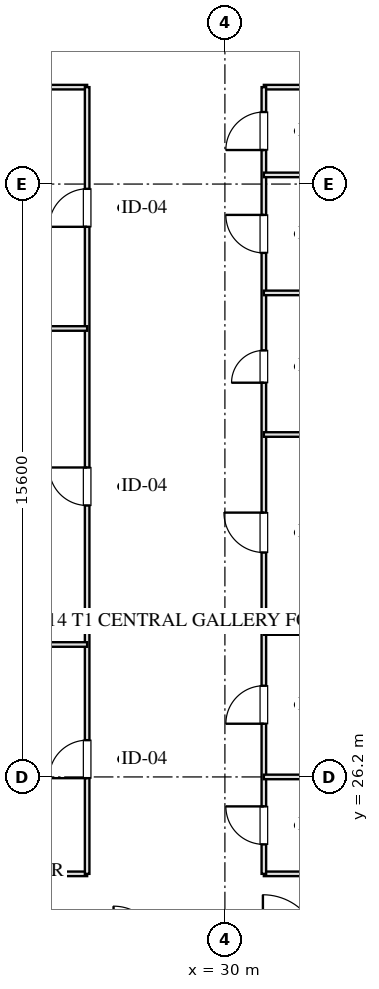
"""IFC4 building model, lengths in metres.
Left out: names, types, materials, properties, quantities, classifications, styles, units other than length and angle.
Written with IfcOpenShell. Run it as: python <this file> out.ifc"""

import sys

from ifc_helpers import new_model, si_unit, direction, frame, frame_2d, origin, place, context, subcontext, project, spatial, rectangle, extrude, element, fill, save


model = new_model("IFC4")
c1 = context("Model", 3, precision=1e-05, world=origin(), true_north=direction((0.0, 1.0)))
c2 = subcontext(c1, "Body", "Model", "MODEL_VIEW")
j1 = project(units=[si_unit("LENGTHUNIT", "METRE"), si_unit("PLANEANGLEUNIT", "RADIAN")], contexts=[c1])
p1 = place(None, origin())
s1 = spatial("IfcSite", under=j1, at=p1, CompositionType="ELEMENT")
p2 = place(p1, origin())
s2 = spatial("IfcBuilding", under=s1, at=p2, CompositionType="ELEMENT")
p3 = place(p2, frame((0.0, 0.0, 60.95)))
s3 = spatial("IfcBuildingStorey", under=s2, at=p3, CompositionType="ELEMENT", Elevation=60.95)
p4 = place(p3, frame((10.6, 23.65, 0.0), z_axis=(0.0, 0.0, 1.0), x_axis=(1.0, 0.0, 0.0)))
e1 = element("IfcWall", 1, at=p4, inside=s3, PredefinedType="PARTITIONING", context=c2, shape_type="SweptSolid", body=[
    extrude(rectangle(XDim=15.775, YDim=0.12, at=frame_2d((7.887, 0.0))), origin(), (0.0, 0.0, 1.0), 3.175),
])
p5 = place(p3, frame((31.025, 23.65, 0.0), z_axis=(0.0, 0.0, 1.0), x_axis=(1.0, 0.0, 0.0)))
e2 = element("IfcWall", 2, at=p5, inside=s3, PredefinedType="PARTITIONING", context=c2, shape_type="SweptSolid", body=[
    extrude(rectangle(XDim=18.375, YDim=0.12, at=frame_2d((9.188, 0.0))), origin(), (0.0, 0.0, 1.0), 3.175),
])
p6 = place(p3, frame((10.6, 44.35, 0.0), z_axis=(0.0, 0.0, 1.0), x_axis=(1.0, 0.0, 0.0)))
e3 = element("IfcWall", 3, at=p6, inside=s3, PredefinedType="PARTITIONING", context=c2, shape_type="SweptSolid", body=[
    extrude(rectangle(XDim=15.775, YDim=0.12, at=frame_2d((7.887, 0.0))), origin(), (0.0, 0.0, 1.0), 3.175),
])
p7 = place(p3, frame((31.025, 44.35, 0.0), z_axis=(0.0, 0.0, 1.0), x_axis=(1.0, 0.0, 0.0)))
e4 = element("IfcWall", 4, at=p7, inside=s3, PredefinedType="PARTITIONING", context=c2, shape_type="SweptSolid", body=[
    extrude(rectangle(XDim=18.375, YDim=0.12, at=frame_2d((9.188, 0.0))), origin(), (0.0, 0.0, 1.0), 3.175),
])
p8 = place(p3, frame((26.375, 23.65, 0.0), z_axis=(0.0, 0.0, 1.0), x_axis=(0.0, 1.0, 0.0)))
e5 = element("IfcWall", 5, at=p8, inside=s3, PredefinedType="PARTITIONING", context=c2, shape_type="SweptSolid", body=[
    extrude(rectangle(XDim=20.7, YDim=0.12, at=frame_2d((10.35, 0.0))), origin(), (0.0, 0.0, 1.0), 3.175),
])
p9 = place(p8, frame((2.518, 0.0, 0.0)))
e6 = element("IfcOpeningElement", 6, at=p9, cuts=e5, PredefinedType="OPENING", context=c2, shape_type="SweptSolid", body=[
    extrude(rectangle(XDim=1.0, YDim=2.05, at=frame_2d((0.5, 1.025))), frame((0.0, 0.07, 0.0), z_axis=(0.0, -1.0, 0.0), x_axis=(1.0, 0.0, 0.0)), (0.0, 0.0, 1.0), 0.14),
])
p10 = place(p8, frame((9.692, 0.0, 0.0)))
e7 = element("IfcOpeningElement", 7, at=p10, cuts=e5, PredefinedType="OPENING", context=c2, shape_type="SweptSolid", body=[
    extrude(rectangle(XDim=1.0, YDim=2.05, at=frame_2d((0.5, 1.025))), frame((0.0, 0.07, 0.0), z_axis=(0.0, -1.0, 0.0), x_axis=(1.0, 0.0, 0.0)), (0.0, 0.0, 1.0), 0.14),
])
p11 = place(p8, frame((17.025, 0.0, 0.0)))
e8 = element("IfcOpeningElement", 8, at=p11, cuts=e5, PredefinedType="OPENING", context=c2, shape_type="SweptSolid", body=[
    extrude(rectangle(XDim=1.0, YDim=2.05, at=frame_2d((0.5, 1.025))), frame((0.0, 0.07, 0.0), z_axis=(0.0, -1.0, 0.0), x_axis=(1.0, 0.0, 0.0)), (0.0, 0.0, 1.0), 0.14),
])
p12 = place(p3, frame((31.025, 23.65, 0.0), z_axis=(0.0, 0.0, 1.0), x_axis=(0.0, 1.0, 0.0)))
e9 = element("IfcWall", 9, at=p12, inside=s3, PredefinedType="PARTITIONING", context=c2, shape_type="SweptSolid", body=[
    extrude(rectangle(XDim=20.7, YDim=0.12, at=frame_2d((10.35, 0.0))), origin(), (0.0, 0.0, 1.0), 3.175),
])
p13 = place(p12, frame((0.775, 0.0, 0.0)))
e10 = element("IfcOpeningElement", 10, at=p13, cuts=e9, PredefinedType="OPENING", context=c2, shape_type="SweptSolid", body=[
    extrude(rectangle(XDim=1.0, YDim=2.05, at=frame_2d((0.5, 1.025))), frame((0.0, 0.07, 0.0), z_axis=(0.0, -1.0, 0.0), x_axis=(1.0, 0.0, 0.0)), (0.0, 0.0, 1.0), 0.14),
])
p14 = place(p12, frame((3.95, 0.0, 0.0)))
e11 = element("IfcOpeningElement", 11, at=p14, cuts=e9, PredefinedType="OPENING", context=c2, shape_type="SweptSolid", body=[
    extrude(rectangle(XDim=1.0, YDim=2.05, at=frame_2d((0.5, 1.025))), frame((0.0, 0.07, 0.0), z_axis=(0.0, -1.0, 0.0), x_axis=(1.0, 0.0, 0.0)), (0.0, 0.0, 1.0), 0.14),
])
p15 = place(p12, frame((8.455, 0.0, 0.0)))
e12 = element("IfcOpeningElement", 12, at=p15, cuts=e9, PredefinedType="OPENING", context=c2, shape_type="SweptSolid", body=[
    extrude(rectangle(XDim=1.05, YDim=2.05, at=frame_2d((0.525, 1.025))), frame((0.0, 0.07, 0.0), z_axis=(0.0, -1.0, 0.0), x_axis=(1.0, 0.0, 0.0)), (0.0, 0.0, 1.0), 0.14),
])
p16 = place(p12, frame((12.923, 0.0, 0.0)))
e13 = element("IfcOpeningElement", 13, at=p16, cuts=e9, PredefinedType="OPENING", context=c2, shape_type="SweptSolid", body=[
    extrude(rectangle(XDim=0.85, YDim=2.05, at=frame_2d((0.425, 1.025))), frame((0.0, 0.07, 0.0), z_axis=(0.0, -1.0, 0.0), x_axis=(1.0, 0.0, 0.0)), (0.0, 0.0, 1.0), 0.14),
])
p17 = place(p12, frame((16.338, 0.0, 0.0)))
e14 = element("IfcOpeningElement", 14, at=p17, cuts=e9, PredefinedType="OPENING", context=c2, shape_type="SweptSolid", body=[
    extrude(rectangle(XDim=1.0, YDim=2.05, at=frame_2d((0.5, 1.025))), frame((0.0, 0.07, 0.0), z_axis=(0.0, -1.0, 0.0), x_axis=(1.0, 0.0, 0.0)), (0.0, 0.0, 1.0), 0.14),
])
p18 = place(p12, frame((19.045, 0.0, 0.0)))
e15 = element("IfcOpeningElement", 15, at=p18, cuts=e9, PredefinedType="OPENING", context=c2, shape_type="SweptSolid", body=[
    extrude(rectangle(XDim=1.0, YDim=2.05, at=frame_2d((0.5, 1.025))), frame((0.0, 0.07, 0.0), z_axis=(0.0, -1.0, 0.0), x_axis=(1.0, 0.0, 0.0)), (0.0, 0.0, 1.0), 0.14),
])
for number, where, z_axis, x_axis in (
    (16, (10.6, 29.685, 0.0), (0.0, 0.0, 1.0), (1.0, 0.0, 0.0)),
    (17, (10.6, 38.0, 0.0), (0.0, 0.0, 1.0), (1.0, 0.0, 0.0)),
):
    element("IfcWall", number, at=place(p3, frame(where, z_axis=z_axis, x_axis=x_axis)), inside=s3, PredefinedType="PARTITIONING", context=c2, shape_type="SweptSolid", body=[
        extrude(rectangle(XDim=15.775, YDim=0.12, at=frame_2d((7.887, 0.0))), origin(), (0.0, 0.0, 1.0), 3.175),
    ])
for number, where, z_axis, x_axis in (
    (18, (31.025, 26.2, 0.0), (0.0, 0.0, 1.0), (1.0, 0.0, 0.0)),
    (19, (31.025, 30.0, 0.0), (0.0, 0.0, 1.0), (1.0, 0.0, 0.0)),
    (20, (31.025, 35.21, 0.0), (0.0, 0.0, 1.0), (1.0, 0.0, 0.0)),
    (21, (31.025, 38.936, 0.0), (0.0, 0.0, 1.0), (1.0, 0.0, 0.0)),
    (22, (31.025, 42.041, 0.0), (0.0, 0.0, 1.0), (1.0, 0.0, 0.0)),
):
    element("IfcWall", number, at=place(p3, frame(where, z_axis=z_axis, x_axis=x_axis)), inside=s3, PredefinedType="PARTITIONING", context=c2, shape_type="SweptSolid", body=[
        extrude(rectangle(XDim=18.375, YDim=0.12, at=frame_2d((9.188, 0.0))), origin(), (0.0, 0.0, 1.0), 3.175),
    ])
p19 = place(p9, origin())
e23 = element("IfcDoor", 23, at=p19, inside=s3, OperationType="SINGLE_SWING_LEFT", PredefinedType="DOOR", context=c2, shape_type="SweptSolid", body=[
    extrude(rectangle(XDim=1.0, YDim=2.05, at=frame_2d((0.5, 1.025))), frame((0.0, 0.025, 0.0), z_axis=(0.0, -1.0, 0.0), x_axis=(1.0, 0.0, 0.0)), (0.0, 0.0, 1.0), 0.05),
])
fill(e6, e23)
p20 = place(p10, origin())
e24 = element("IfcDoor", 24, at=p20, inside=s3, OperationType="SINGLE_SWING_RIGHT", PredefinedType="DOOR", context=c2, shape_type="SweptSolid", body=[
    extrude(rectangle(XDim=1.0, YDim=2.05, at=frame_2d((0.5, 1.025))), frame((0.0, 0.025, 0.0), z_axis=(0.0, -1.0, 0.0), x_axis=(1.0, 0.0, 0.0)), (0.0, 0.0, 1.0), 0.05),
])
fill(e7, e24)
p21 = place(p11, origin())
e25 = element("IfcDoor", 25, at=p21, inside=s3, OperationType="SINGLE_SWING_LEFT", PredefinedType="DOOR", context=c2, shape_type="SweptSolid", body=[
    extrude(rectangle(XDim=1.0, YDim=2.05, at=frame_2d((0.5, 1.025))), frame((0.0, 0.025, 0.0), z_axis=(0.0, -1.0, 0.0), x_axis=(1.0, 0.0, 0.0)), (0.0, 0.0, 1.0), 0.05),
])
fill(e8, e25)
p22 = place(p13, origin())
e26 = element("IfcDoor", 26, at=p22, inside=s3, OperationType="SINGLE_SWING_RIGHT", PredefinedType="DOOR", context=c2, shape_type="SweptSolid", body=[
    extrude(rectangle(XDim=1.0, YDim=2.05, at=frame_2d((0.5, 1.025))), frame((0.0, 0.025, 0.0), z_axis=(0.0, -1.0, 0.0), x_axis=(1.0, 0.0, 0.0)), (0.0, 0.0, 1.0), 0.05),
])
fill(e10, e26)
p23 = place(p14, origin())
e27 = element("IfcDoor", 27, at=p23, inside=s3, OperationType="SINGLE_SWING_LEFT", PredefinedType="DOOR", context=c2, shape_type="SweptSolid", body=[
    extrude(rectangle(XDim=1.0, YDim=2.05, at=frame_2d((0.5, 1.025))), frame((0.0, 0.025, 0.0), z_axis=(0.0, -1.0, 0.0), x_axis=(1.0, 0.0, 0.0)), (0.0, 0.0, 1.0), 0.05),
])
fill(e11, e27)
p24 = place(p15, origin())
e28 = element("IfcDoor", 28, at=p24, inside=s3, OperationType="SINGLE_SWING_RIGHT", PredefinedType="DOOR", context=c2, shape_type="SweptSolid", body=[
    extrude(rectangle(XDim=1.05, YDim=2.05, at=frame_2d((0.525, 1.025))), frame((0.0, 0.025, 0.0), z_axis=(0.0, -1.0, 0.0), x_axis=(1.0, 0.0, 0.0)), (0.0, 0.0, 1.0), 0.05),
])
fill(e12, e28)
p25 = place(p16, origin())
e29 = element("IfcDoor", 29, at=p25, inside=s3, OperationType="SINGLE_SWING_LEFT", PredefinedType="DOOR", context=c2, shape_type="SweptSolid", body=[
    extrude(rectangle(XDim=0.85, YDim=2.05, at=frame_2d((0.425, 1.025))), frame((0.0, 0.025, 0.0), z_axis=(0.0, -1.0, 0.0), x_axis=(1.0, 0.0, 0.0)), (0.0, 0.0, 1.0), 0.05),
])
fill(e13, e29)
p26 = place(p17, origin())
e30 = element("IfcDoor", 30, at=p26, inside=s3, OperationType="SINGLE_SWING_RIGHT", PredefinedType="DOOR", context=c2, shape_type="SweptSolid", body=[
    extrude(rectangle(XDim=1.0, YDim=2.05, at=frame_2d((0.5, 1.025))), frame((0.0, 0.025, 0.0), z_axis=(0.0, -1.0, 0.0), x_axis=(1.0, 0.0, 0.0)), (0.0, 0.0, 1.0), 0.05),
])
fill(e14, e30)
p27 = place(p18, origin())
e31 = element("IfcDoor", 31, at=p27, inside=s3, OperationType="SINGLE_SWING_LEFT", PredefinedType="DOOR", context=c2, shape_type="SweptSolid", body=[
    extrude(rectangle(XDim=1.0, YDim=2.05, at=frame_2d((0.5, 1.025))), frame((0.0, 0.025, 0.0), z_axis=(0.0, -1.0, 0.0), x_axis=(1.0, 0.0, 0.0)), (0.0, 0.0, 1.0), 0.05),
])
fill(e15, e31)
save(model, sys.argv[1])
